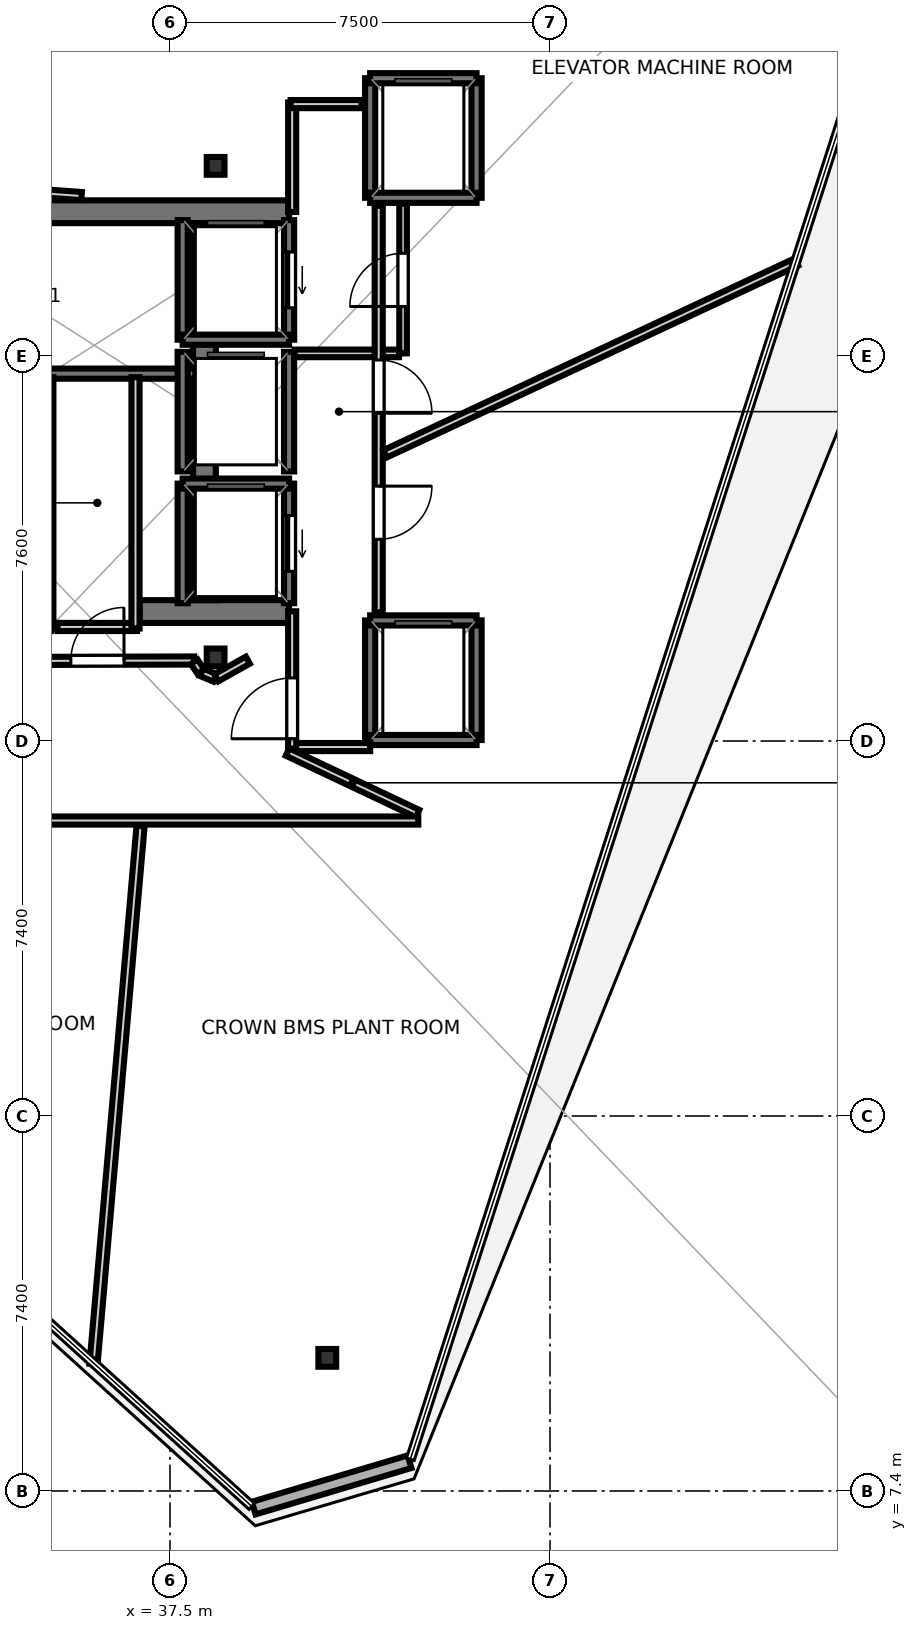
"""IFC4 building model, lengths in metres.
Left out: names, types, materials, properties, quantities, classifications, styles, units other than length and angle.
Written with IfcOpenShell. Run it as: python <this file> out.ifc"""

import sys

from ifc_helpers import new_model, si_unit, direction, frame, frame_2d, origin, origin_2d, place, context, subcontext, project, spatial, rectangle, i_section, extrude, element, fill, save


model = new_model("IFC4")
c1 = context("Model", 3, precision=1e-05, world=origin(), true_north=direction((0.0, 1.0)))
c2 = subcontext(c1, "Body", "Model", "MODEL_VIEW")
j1 = project(units=[si_unit("LENGTHUNIT", "METRE"), si_unit("PLANEANGLEUNIT", "RADIAN")], contexts=[c1])
p1 = place(None, origin())
s1 = spatial("IfcSite", under=j1, at=p1, CompositionType="ELEMENT")
p2 = place(p1, origin())
s2 = spatial("IfcBuilding", under=s1, at=p2, CompositionType="ELEMENT")
p3 = place(p2, frame((0.0, 0.0, 356.3)))
s3 = spatial("IfcBuildingStorey", under=s2, at=p3, CompositionType="ELEMENT", Elevation=356.3)
p4 = place(p3, frame((29.33, 32.645, 0.0), z_axis=(0.0, 0.0, 1.0), x_axis=(1.0, 0.0, 0.0)))
e1 = element("IfcWall", 1, at=p4, inside=s3, PredefinedType="SHEAR", context=c2, shape_type="SweptSolid", body=[
    extrude(rectangle(XDim=10.52, YDim=0.45, at=frame_2d((5.26, 0.0))), origin(), (0.0, 0.0, 1.0), 3.55),
])
p5 = place(p3, frame((36.9, 24.755, 0.0), z_axis=(0.0, 0.0, 1.0), x_axis=(1.0, 0.0, 0.0)))
e2 = element("IfcWall", 2, at=p5, inside=s3, PredefinedType="SHEAR", context=c2, shape_type="SweptSolid", body=[
    extrude(rectangle(XDim=2.95, YDim=0.45, at=frame_2d((1.475, 0.0))), origin(), (0.0, 0.0, 1.0), 3.55),
])
p6 = place(p3, frame((38.18, 24.98, 0.0), z_axis=(0.0, 0.0, 1.0), x_axis=(0.0, 1.0, 0.0)))
e3 = element("IfcWall", 3, at=p6, inside=s3, PredefinedType="SHEAR", context=c2, shape_type="SweptSolid", body=[
    extrude(rectangle(XDim=7.44, YDim=0.45, at=frame_2d((3.72, 0.0))), origin(), (0.0, 0.0, 1.0), 3.55),
])
for number, where, z_axis, x_axis in (
    (4, (38.4, 33.55, 0.0), (0.0, 0.0, 1.0), (1.0, 0.0, 0.0)),
    (5, (38.4, 23.85, 0.0), (0.0, 0.0, 1.0), (1.0, 0.0, 0.0)),
):
    element("IfcColumn", number, at=place(p3, frame(where, z_axis=z_axis, x_axis=x_axis)), inside=s3, PredefinedType="COLUMN", context=c2, shape_type="SweptSolid", body=[
        extrude(i_section(OverallWidth=0.35, OverallDepth=0.35, WebThickness=0.012, FlangeThickness=0.019, at=origin_2d()), origin(), (0.0, 0.0, 1.0), 3.75),
    ])
p7 = place(p3, frame((40.604, 10.027, -0.25), z_axis=(0.0, 0.0, 1.0), x_axis=(1.0, 0.0, 0.0)))
e6 = element("IfcColumn", 6, at=p7, inside=s3, PredefinedType="COLUMN", context=c2, shape_type="SweptSolid", body=[
    extrude(i_section(OverallWidth=0.35, OverallDepth=0.35, WebThickness=0.012, FlangeThickness=0.019, at=origin_2d()), origin(), (0.0, 0.0, 1.0), 4.0),
])
p8 = place(p3, frame((39.152, 7.062, 0.0), z_axis=(0.0, 0.0, 1.0), x_axis=(0.958466686006, 0.285204508758, 0.0)))
e7 = element("IfcWall", 7, at=p8, inside=s3, PredefinedType="SOLIDWALL", context=c2, shape_type="SweptSolid", body=[
    extrude(rectangle(XDim=3.209, YDim=0.26, at=frame_2d((1.604, 0.0))), origin(), (0.0, 0.0, 1.0), 3.55),
])
p9 = place(p3, frame((29.7, 29.45, 0.0), z_axis=(0.0, 0.0, 1.0), x_axis=(1.0, 0.0, 0.0)))
e8 = element("IfcWall", 8, at=p9, inside=s3, PredefinedType="SOLIDWALL", context=c2, shape_type="SweptSolid", body=[
    extrude(rectangle(XDim=8.3, YDim=0.2, at=frame_2d((4.15, 0.0))), origin(), (0.0, 0.0, 1.0), 3.55),
])
p10 = place(p9, frame((0.595, 0.0, 0.0)))
e9 = element("IfcOpeningElement", 9, at=p10, cuts=e8, PredefinedType="OPENING", context=c2, shape_type="SweptSolid", body=[
    extrude(rectangle(XDim=1.25, YDim=2.15, at=frame_2d((0.625, 1.075))), frame((0.0, 0.11, 0.0), z_axis=(0.0, -1.0, 0.0), x_axis=(1.0, 0.0, 0.0)), (0.0, 0.0, 1.0), 0.22),
])
p11 = place(p3, frame((39.85, 30.12, 0.0), z_axis=(0.0, 0.0, 1.0), x_axis=(0.0, 1.0, 0.0)))
e10 = element("IfcWall", 10, at=p11, inside=s3, PredefinedType="SOLIDWALL", context=c2, shape_type="SweptSolid", body=[
    extrude(rectangle(XDim=2.36, YDim=0.2, at=frame_2d((1.18, 0.0))), origin(), (0.0, 0.0, 1.0), 3.55),
])
p12 = place(p11, frame((0.63, 0.0, 0.0)))
e11 = element("IfcOpeningElement", 11, at=p12, cuts=e10, PredefinedType="OPENING", context=c2, shape_type="SweptSolid", body=[
    extrude(rectangle(XDim=1.1, YDim=2.15, at=frame_2d((0.55, 1.075))), frame((0.0, 0.11, 0.0), z_axis=(0.0, -1.0, 0.0), x_axis=(1.0, 0.0, 0.0)), (0.0, 0.0, 1.0), 0.22),
])
p13 = place(p3, frame((37.75, 30.12, 0.0), z_axis=(0.0, 0.0, 1.0), x_axis=(0.0, 1.0, 0.0)))
e12 = element("IfcWall", 12, at=p13, inside=s3, PredefinedType="SOLIDWALL", context=c2, shape_type="SweptSolid", body=[
    extrude(rectangle(XDim=2.36, YDim=0.2, at=frame_2d((1.18, 0.0))), origin(), (0.0, 0.0, 1.0), 3.55),
])
p14 = place(p3, frame((37.75, 30.12, 0.0), z_axis=(0.0, 0.0, 1.0), x_axis=(1.0, 0.0, 0.0)))
e13 = element("IfcWall", 13, at=p14, inside=s3, PredefinedType="SOLIDWALL", context=c2, shape_type="SweptSolid", body=[
    extrude(rectangle(XDim=2.1, YDim=0.2, at=frame_2d((1.05, 0.0))), origin(), (0.0, 0.0, 1.0), 3.55),
])
p15 = place(p3, frame((39.85, 24.92, 0.0), z_axis=(0.0, 0.0, 1.0), x_axis=(0.0, 1.0, 0.0)))
e14 = element("IfcWall", 14, at=p15, inside=s3, PredefinedType="SOLIDWALL", context=c2, shape_type="SweptSolid", body=[
    extrude(rectangle(XDim=2.36, YDim=0.2, at=frame_2d((1.18, 0.0))), origin(), (0.0, 0.0, 1.0), 3.55),
])
p16 = place(p15, frame((0.63, 0.0, 0.0)))
e15 = element("IfcOpeningElement", 15, at=p16, cuts=e14, PredefinedType="OPENING", context=c2, shape_type="SweptSolid", body=[
    extrude(rectangle(XDim=1.1, YDim=2.15, at=frame_2d((0.55, 1.075))), frame((0.0, 0.11, 0.0), z_axis=(0.0, -1.0, 0.0), x_axis=(1.0, 0.0, 0.0)), (0.0, 0.0, 1.0), 0.22),
])
p17 = place(p3, frame((37.75, 24.92, 0.0), z_axis=(0.0, 0.0, 1.0), x_axis=(0.0, 1.0, 0.0)))
e16 = element("IfcWall", 16, at=p17, inside=s3, PredefinedType="SOLIDWALL", context=c2, shape_type="SweptSolid", body=[
    extrude(rectangle(XDim=2.36, YDim=0.2, at=frame_2d((1.18, 0.0))), origin(), (0.0, 0.0, 1.0), 3.55),
])
p18 = place(p3, frame((37.75, 27.28, 0.0), z_axis=(0.0, 0.0, 1.0), x_axis=(1.0, 0.0, 0.0)))
e17 = element("IfcWall", 17, at=p18, inside=s3, PredefinedType="SOLIDWALL", context=c2, shape_type="SweptSolid", body=[
    extrude(rectangle(XDim=2.1, YDim=0.2, at=frame_2d((1.05, 0.0))), origin(), (0.0, 0.0, 1.0), 3.55),
])
for number, where, z_axis, x_axis in (
    (18, (39.85, 27.52, 0.0), (0.0, 0.0, 1.0), (0.0, 1.0, 0.0)),
    (19, (37.75, 27.52, 0.0), (0.0, 0.0, 1.0), (0.0, 1.0, 0.0)),
):
    element("IfcWall", number, at=place(p3, frame(where, z_axis=z_axis, x_axis=x_axis)), inside=s3, PredefinedType="SOLIDWALL", context=c2, shape_type="SweptSolid", body=[
        extrude(rectangle(XDim=2.36, YDim=0.2, at=frame_2d((1.18, 0.0))), origin(), (0.0, 0.0, 1.0), 3.55),
    ])
for number, where, z_axis, x_axis in (
    (20, (43.55, 22.22, 0.0), (0.0, 0.0, 1.0), (0.0, 1.0, 0.0)),
    (21, (41.45, 22.22, 0.0), (0.0, 0.0, 1.0), (0.0, 1.0, 0.0)),
):
    element("IfcWall", number, at=place(p3, frame(where, z_axis=z_axis, x_axis=x_axis)), inside=s3, PredefinedType="SOLIDWALL", context=c2, shape_type="SweptSolid", body=[
        extrude(rectangle(XDim=2.36, YDim=0.2, at=frame_2d((1.18, 0.0))), origin(), (0.0, 0.0, 1.0), 3.55),
    ])
for number, where, z_axis, x_axis in (
    (22, (41.45, 24.58, 0.0), (0.0, 0.0, 1.0), (1.0, 0.0, 0.0)),
    (23, (41.45, 22.22, 0.0), (0.0, 0.0, 1.0), (1.0, 0.0, 0.0)),
):
    element("IfcWall", number, at=place(p3, frame(where, z_axis=z_axis, x_axis=x_axis)), inside=s3, PredefinedType="SOLIDWALL", context=c2, shape_type="SweptSolid", body=[
        extrude(rectangle(XDim=2.1, YDim=0.2, at=frame_2d((1.05, 0.0))), origin(), (0.0, 0.0, 1.0), 3.55),
    ])
for number, where, z_axis, x_axis in (
    (24, (43.55, 32.92, 0.0), (0.0, 0.0, 1.0), (0.0, 1.0, 0.0)),
    (25, (41.45, 32.92, 0.0), (0.0, 0.0, 1.0), (0.0, 1.0, 0.0)),
):
    element("IfcWall", number, at=place(p3, frame(where, z_axis=z_axis, x_axis=x_axis)), inside=s3, PredefinedType="SOLIDWALL", context=c2, shape_type="SweptSolid", body=[
        extrude(rectangle(XDim=2.36, YDim=0.2, at=frame_2d((1.18, 0.0))), origin(), (0.0, 0.0, 1.0), 3.55),
    ])
for number, where, z_axis, x_axis in (
    (26, (41.45, 35.28, 0.0), (0.0, 0.0, 1.0), (1.0, 0.0, 0.0)),
    (27, (41.45, 32.92, 0.0), (0.0, 0.0, 1.0), (1.0, 0.0, 0.0)),
):
    element("IfcWall", number, at=place(p3, frame(where, z_axis=z_axis, x_axis=x_axis)), inside=s3, PredefinedType="SOLIDWALL", context=c2, shape_type="SweptSolid", body=[
        extrude(rectangle(XDim=2.1, YDim=0.2, at=frame_2d((1.05, 0.0))), origin(), (0.0, 0.0, 1.0), 3.55),
    ])
p19 = place(p3, frame((42.1, 29.85, 0.0), z_axis=(0.0, 0.0, 1.0), x_axis=(0.0, 1.0, 0.0)))
e28 = element("IfcWall", 28, at=p19, inside=s3, PredefinedType="PARTITIONING", context=c2, shape_type="SweptSolid", body=[
    extrude(rectangle(XDim=2.95, YDim=0.15, at=frame_2d((1.475, 0.0))), origin(), (0.0, 0.0, 1.0), 2.87),
])
p20 = place(p19, frame((0.925, 0.0, 0.0)))
e29 = element("IfcOpeningElement", 29, at=p20, cuts=e28, PredefinedType="OPENING", context=c2, shape_type="SweptSolid", body=[
    extrude(rectangle(XDim=1.05, YDim=2.15, at=frame_2d((0.525, 1.075))), frame((0.0, 0.085, 0.0), z_axis=(0.0, -1.0, 0.0), x_axis=(1.0, 0.0, 0.0)), (0.0, 0.0, 1.0), 0.17),
])
p21 = place(p3, frame((39.96, 29.85, 0.0), z_axis=(0.0, 0.0, 1.0), x_axis=(1.0, 0.0, 0.0)))
e30 = element("IfcWall", 30, at=p21, inside=s3, PredefinedType="PARTITIONING", context=c2, shape_type="SweptSolid", body=[
    extrude(rectangle(XDim=2.06, YDim=0.15, at=frame_2d((1.03, 0.0))), origin(), (0.0, 0.0, 1.0), 2.87),
])
p22 = place(p3, frame((35.119, 29.38, 0.0), z_axis=(0.0, 0.0, 1.0), x_axis=(0.0, -1.0, 0.0)))
e31 = element("IfcWall", 31, at=p22, inside=s3, PredefinedType="PARTITIONING", context=c2, shape_type="SweptSolid", body=[
    extrude(rectangle(XDim=4.96, YDim=0.16, at=frame_2d((2.48, 0.0))), origin(), (0.0, 0.0, 1.0), 2.08),
])
p23 = place(p3, frame((41.619, 32.76, 0.0), z_axis=(0.0, 0.0, 1.0), x_axis=(0.0, -1.0, 0.0)))
e32 = element("IfcWall", 32, at=p23, inside=s3, PredefinedType="PARTITIONING", context=c2, shape_type="SweptSolid", body=[
    extrude(rectangle(XDim=8.02, YDim=0.16, at=frame_2d((4.01, 0.0))), origin(), (0.0, 0.0, 1.0), 2.87),
])
p24 = place(p23, frame((5.53, 0.0, 0.0)))
e33 = element("IfcOpeningElement", 33, at=p24, cuts=e32, PredefinedType="OPENING", context=c2, shape_type="SweptSolid", body=[
    extrude(rectangle(XDim=1.05, YDim=2.15, at=frame_2d((0.525, 1.075))), frame((0.0, 0.09, 0.0), z_axis=(0.0, -1.0, 0.0), x_axis=(1.0, 0.0, 0.0)), (0.0, 0.0, 1.0), 0.18),
])
p25 = place(p23, frame((3.041, 0.0, 0.0)))
e34 = element("IfcOpeningElement", 34, at=p25, cuts=e32, PredefinedType="OPENING", context=c2, shape_type="SweptSolid", body=[
    extrude(rectangle(XDim=1.05, YDim=2.15, at=frame_2d((0.525, 1.075))), frame((0.0, 0.09, 0.0), z_axis=(0.0, -1.0, 0.0), x_axis=(1.0, 0.0, 0.0)), (0.0, 0.0, 1.0), 0.18),
])
p26 = place(p3, frame((41.45, 22.081, 0.0), z_axis=(0.0, 0.0, 1.0), x_axis=(-1.0, 0.0, 0.0)))
e35 = element("IfcWall", 35, at=p26, inside=s3, PredefinedType="PARTITIONING", context=c2, shape_type="SweptSolid", body=[
    extrude(rectangle(XDim=1.57, YDim=0.16, at=frame_2d((0.785, 0.0))), origin(), (0.0, 0.0, 1.0), 2.87),
])
p27 = place(p3, frame((39.911, 22.05, 0.0), z_axis=(0.0, 0.0, 1.0), x_axis=(0.0, 1.0, 0.0)))
e36 = element("IfcWall", 36, at=p27, inside=s3, PredefinedType="PARTITIONING", context=c2, shape_type="SweptSolid", body=[
    extrude(rectangle(XDim=2.71, YDim=0.16, at=frame_2d((1.355, 0.0))), origin(), (0.0, 0.0, 1.0), 2.87),
])
p28 = place(p27, frame((0.195, 0.0, 0.0)))
e37 = element("IfcOpeningElement", 37, at=p28, cuts=e36, PredefinedType="OPENING", context=c2, shape_type="SweptSolid", body=[
    extrude(rectangle(XDim=1.2, YDim=2.15, at=frame_2d((0.6, 1.075))), frame((0.0, 0.09, 0.0), z_axis=(0.0, -1.0, 0.0), x_axis=(1.0, 0.0, 0.0)), (0.0, 0.0, 1.0), 0.18),
])
p29 = place(p3, frame((39.911, 32.64, 0.0), z_axis=(0.0, 0.0, 1.0), x_axis=(0.0, 1.0, 0.0)))
e38 = element("IfcWall", 38, at=p29, inside=s3, PredefinedType="PARTITIONING", context=c2, shape_type="SweptSolid", body=[
    extrude(rectangle(XDim=2.16, YDim=0.16, at=frame_2d((1.08, 0.0))), origin(), (0.0, 0.0, 1.0), 2.87),
])
p30 = place(p3, frame((39.88, 34.769, 0.0), z_axis=(0.0, 0.0, 1.0), x_axis=(1.0, 0.0, 0.0)))
e39 = element("IfcWall", 39, at=p30, inside=s3, PredefinedType="PARTITIONING", context=c2, shape_type="SweptSolid", body=[
    extrude(rectangle(XDim=1.4, YDim=0.16, at=frame_2d((0.7, 0.0))), origin(), (0.0, 0.0, 1.0), 2.87),
])
p31 = place(p3, frame((36.85, 24.451, 0.0), z_axis=(0.0, 0.0, 1.0), x_axis=(-1.0, 0.0, 0.0)))
e40 = element("IfcWall", 40, at=p31, inside=s3, PredefinedType="PARTITIONING", context=c2, shape_type="SweptSolid", body=[
    extrude(rectangle(XDim=1.57, YDim=0.16, at=frame_2d((0.785, 0.0))), origin(), (0.0, 0.0, 1.0), 2.87),
])
p32 = place(p3, frame((36.819, 29.38, 0.0), z_axis=(0.0, 0.0, 1.0), x_axis=(0.0, -1.0, 0.0)))
e41 = element("IfcWall", 41, at=p32, inside=s3, PredefinedType="PARTITIONING", context=c2, shape_type="SweptSolid", body=[
    extrude(rectangle(XDim=4.96, YDim=0.16, at=frame_2d((2.48, 0.0))), origin(), (0.0, 0.0, 1.0), 2.87),
])
p33 = place(p3, frame((29.184, 23.767, 0.0), z_axis=(0.0, 0.0, 1.0), x_axis=(0.999996878137, 0.002498742824, 0.0)))
e42 = element("IfcWall", 42, at=p33, inside=s3, PredefinedType="PARTITIONING", context=c2, shape_type="SweptSolid", body=[
    extrude(rectangle(XDim=8.793, YDim=0.16, at=frame_2d((4.397, 0.0))), origin(), (0.0, 0.0, 1.0), 2.87),
])
p34 = place(p33, frame((2.831, 0.0, 0.0)))
e43 = element("IfcOpeningElement", 43, at=p34, cuts=e42, PredefinedType="OPENING", context=c2, shape_type="SweptSolid", body=[
    extrude(rectangle(XDim=1.2, YDim=2.15, at=frame_2d((0.6, 1.075))), frame((0.0, 0.09, 0.0), z_axis=(0.0, -1.0, 0.0), x_axis=(1.0, 0.0, 0.0)), (0.0, 0.0, 1.0), 0.18),
])
p35 = place(p33, frame((6.359, 0.0, 0.0)))
e44 = element("IfcOpeningElement", 44, at=p35, cuts=e42, PredefinedType="OPENING", context=c2, shape_type="SweptSolid", body=[
    extrude(rectangle(XDim=1.05, YDim=2.15, at=frame_2d((0.525, 1.075))), frame((0.0, 0.09, 0.0), z_axis=(0.0, -1.0, 0.0), x_axis=(1.0, 0.0, 0.0)), (0.0, 0.0, 1.0), 0.18),
])
p36 = place(p33, frame((1.431, 0.0, 0.0)))
e45 = element("IfcOpeningElement", 45, at=p36, cuts=e42, PredefinedType="OPENING", context=c2, shape_type="SweptSolid", body=[
    extrude(rectangle(XDim=1.2, YDim=2.15, at=frame_2d((0.6, 1.075))), frame((0.0, 0.09, 0.0), z_axis=(0.0, -1.0, 0.0), x_axis=(1.0, 0.0, 0.0)), (0.0, 0.0, 1.0), 0.18),
])
p37 = place(p3, frame((37.978, 23.764, 0.0), z_axis=(0.0, 0.0, 1.0), x_axis=(0.556130652598, -0.831094878604, 0.0)))
e46 = element("IfcWall", 46, at=p37, inside=s3, PredefinedType="PARTITIONING", context=c2, shape_type="SweptSolid", body=[
    extrude(rectangle(XDim=0.236, YDim=0.16, at=frame_2d((0.118, 0.0))), origin(), (0.0, 0.0, 1.0), 2.87),
])
p38 = place(p3, frame((38.123, 23.556, 0.0), z_axis=(0.0, 0.0, 1.0), x_axis=(0.92383017907, -0.382802560388, 0.0)))
e47 = element("IfcWall", 47, at=p38, inside=s3, PredefinedType="PARTITIONING", context=c2, shape_type="SweptSolid", body=[
    extrude(rectangle(XDim=0.287, YDim=0.16, at=frame_2d((0.144, 0.0))), origin(), (0.0, 0.0, 1.0), 2.87),
])
p39 = place(p3, frame((38.415, 23.448, 0.0), z_axis=(0.0, 0.0, 1.0), x_axis=(0.872599584194, 0.488436245241, 0.0)))
e48 = element("IfcWall", 48, at=p39, inside=s3, PredefinedType="PARTITIONING", context=c2, shape_type="SweptSolid", body=[
    extrude(rectangle(XDim=0.712, YDim=0.16, at=frame_2d((0.356, 0.0))), origin(), (0.0, 0.0, 1.0), 2.87),
])
p40 = place(p3, frame((39.819, 21.983, 0.0), z_axis=(0.0, 0.0, 1.0), x_axis=(0.903977450813, -0.427580130994, 0.0)))
e49 = element("IfcWall", 49, at=p40, inside=s3, PredefinedType="PARTITIONING", context=c2, shape_type="SweptSolid", body=[
    extrude(rectangle(XDim=2.841, YDim=0.16, at=frame_2d((1.42, 0.0))), origin(), (0.0, 0.0, 1.0), 2.87),
])
p41 = place(p3, frame((42.4, 20.631, 0.0), z_axis=(0.0, 0.0, 1.0), x_axis=(-1.0, 0.0, 0.0)))
e50 = element("IfcWall", 50, at=p41, inside=s3, PredefinedType="PARTITIONING", context=c2, shape_type="SweptSolid", body=[
    extrude(rectangle(XDim=16.2, YDim=0.16, at=frame_2d((8.1, 0.0))), origin(), (0.0, 0.0, 1.0), 2.87),
])
p42 = place(p41, frame((9.929, 0.0, 0.0)))
e51 = element("IfcOpeningElement", 51, at=p42, cuts=e50, PredefinedType="OPENING", context=c2, shape_type="SweptSolid", body=[
    extrude(rectangle(XDim=1.05, YDim=2.15, at=frame_2d((0.525, 1.075))), frame((0.0, 0.09, 0.0), z_axis=(0.0, -1.0, 0.0), x_axis=(1.0, 0.0, 0.0)), (0.0, 0.0, 1.0), 0.18),
])
p43 = place(p3, frame((36.919, 20.523, 0.0), z_axis=(0.0, 0.0, 1.0), x_axis=(-0.087148482425, -0.996195333261, 0.0)))
e52 = element("IfcWall", 52, at=p43, inside=s3, PredefinedType="PARTITIONING", context=c2, shape_type="SweptSolid", body=[
    extrude(rectangle(XDim=10.659, YDim=0.16, at=frame_2d((5.33, 0.0))), origin(), (0.0, 0.0, 1.0), 2.87),
])
p44 = place(p3, frame((41.743, 27.867, 0.0), z_axis=(0.0, 0.0, 1.0), x_axis=(0.906309072271, 0.422615505535, 0.0)))
e53 = element("IfcWall", 53, at=p44, inside=s3, PredefinedType="PARTITIONING", context=c2, shape_type="SweptSolid", body=[
    extrude(rectangle(XDim=8.962, YDim=0.16, at=frame_2d((4.481, 0.0))), origin(), (0.0, 0.0, 1.0), 2.87),
])
p45 = place(p3, frame((35.756, 32.955, 0.0), z_axis=(0.0, 0.0, 1.0), x_axis=(-0.997543619883, 0.070048029454, 0.0)))
e54 = element("IfcWall", 54, at=p45, inside=s3, PredefinedType="PARTITIONING", context=c2, shape_type="SweptSolid", body=[
    extrude(rectangle(XDim=6.382, YDim=0.16, at=frame_2d((3.191, 0.0))), origin(), (0.0, 0.0, 1.0), 2.87),
])
p46 = place(p12, origin())
e55 = element("IfcDoor", 55, at=p46, inside=s3, OperationType="SLIDING_TO_LEFT", PredefinedType="DOOR", context=c2, shape_type="SweptSolid", body=[
    extrude(rectangle(XDim=1.1, YDim=2.15, at=frame_2d((0.55, 1.075))), frame((0.0, 0.025, 0.0), z_axis=(0.0, -1.0, 0.0), x_axis=(1.0, 0.0, 0.0)), (0.0, 0.0, 1.0), 0.05),
])
fill(e11, e55)
p47 = place(p16, origin())
e56 = element("IfcDoor", 56, at=p47, inside=s3, OperationType="SLIDING_TO_LEFT", PredefinedType="DOOR", context=c2, shape_type="SweptSolid", body=[
    extrude(rectangle(XDim=1.1, YDim=2.15, at=frame_2d((0.55, 1.075))), frame((0.0, 0.025, 0.0), z_axis=(0.0, -1.0, 0.0), x_axis=(1.0, 0.0, 0.0)), (0.0, 0.0, 1.0), 0.05),
])
fill(e15, e56)
p48 = place(p20, origin())
e57 = element("IfcDoor", 57, at=p48, inside=s3, OperationType="SINGLE_SWING_LEFT", PredefinedType="DOOR", context=c2, shape_type="SweptSolid", body=[
    extrude(rectangle(XDim=1.05, YDim=2.15, at=frame_2d((0.525, 1.075))), frame((0.0, 0.025, 0.0), z_axis=(0.0, -1.0, 0.0), x_axis=(1.0, 0.0, 0.0)), (0.0, 0.0, 1.0), 0.05),
])
fill(e29, e57)
p49 = place(p28, origin())
e58 = element("IfcDoor", 58, at=p49, inside=s3, OperationType="SINGLE_SWING_LEFT", PredefinedType="DOOR", context=c2, shape_type="SweptSolid", body=[
    extrude(rectangle(XDim=1.2, YDim=2.15, at=frame_2d((0.6, 1.075))), frame((0.0, 0.025, 0.0), z_axis=(0.0, -1.0, 0.0), x_axis=(1.0, 0.0, 0.0)), (0.0, 0.0, 1.0), 0.05),
])
fill(e37, e58)
p50 = place(p35, origin())
e59 = element("IfcDoor", 59, at=p50, inside=s3, OperationType="SINGLE_SWING_RIGHT", PredefinedType="DOOR", context=c2, shape_type="SweptSolid", body=[
    extrude(rectangle(XDim=1.05, YDim=2.15, at=frame_2d((0.525, 1.075))), frame((0.0, 0.025, 0.0), z_axis=(0.0, -1.0, 0.0), x_axis=(1.0, 0.0, 0.0)), (0.0, 0.0, 1.0), 0.05),
])
fill(e44, e59)
p51 = place(p24, origin())
e60 = element("IfcDoor", 60, at=p51, inside=s3, OperationType="SINGLE_SWING_LEFT", PredefinedType="DOOR", context=c2, shape_type="SweptSolid", body=[
    extrude(rectangle(XDim=1.05, YDim=2.15, at=frame_2d((0.525, 1.075))), frame((0.0, 0.025, 0.0), z_axis=(0.0, -1.0, 0.0), x_axis=(1.0, 0.0, 0.0)), (0.0, 0.0, 1.0), 0.05),
])
fill(e33, e60)
p52 = place(p25, origin())
e61 = element("IfcDoor", 61, at=p52, inside=s3, OperationType="SINGLE_SWING_RIGHT", PredefinedType="DOOR", context=c2, shape_type="SweptSolid", body=[
    extrude(rectangle(XDim=1.05, YDim=2.15, at=frame_2d((0.525, 1.075))), frame((0.0, 0.025, 0.0), z_axis=(0.0, -1.0, 0.0), x_axis=(1.0, 0.0, 0.0)), (0.0, 0.0, 1.0), 0.05),
])
fill(e34, e61)
save(model, sys.argv[1])
